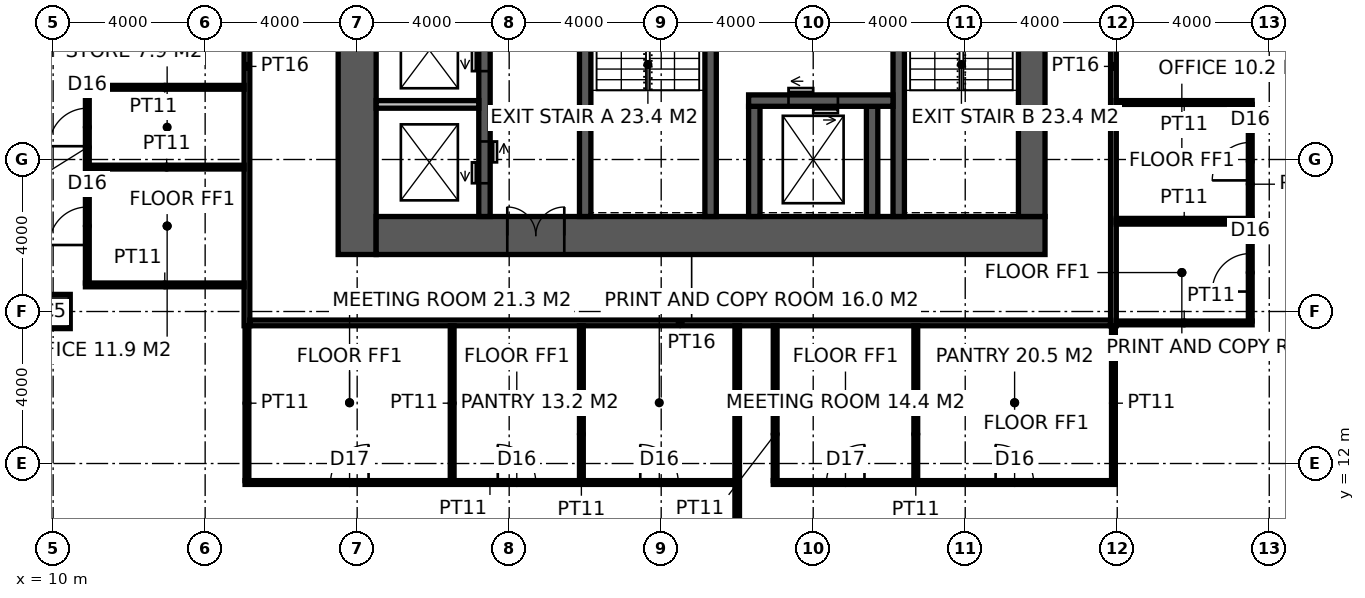
"""IFC4 building model, lengths in metres.
Left out: names, types, materials, properties, quantities, classifications, styles, units other than length and angle.
Written with IfcOpenShell. Run it as: python <this file> out.ifc"""

import sys

from ifc_helpers import new_model, si_unit, direction, frame, frame_2d, origin, origin_2d, place, context, subcontext, project, spatial, rectangle, hollow_rectangle, extrude, element, fill, save


model = new_model("IFC4")
c1 = context("Model", 3, precision=1e-05, world=origin(), true_north=direction((0.0, 1.0)))
c2 = subcontext(c1, "Body", "Model", "MODEL_VIEW")
j1 = project(units=[si_unit("LENGTHUNIT", "METRE"), si_unit("PLANEANGLEUNIT", "RADIAN")], contexts=[c1])
p1 = place(None, origin())
s1 = spatial("IfcSite", under=j1, at=p1, CompositionType="ELEMENT")
p2 = place(p1, origin())
s2 = spatial("IfcBuilding", under=s1, at=p2, CompositionType="ELEMENT")
p3 = place(p2, frame((0.0, 0.0, 147.8)))
s3 = spatial("IfcBuildingStorey", under=s2, at=p3, CompositionType="ELEMENT", Elevation=147.8)
p4 = place(p3, frame((10.0, 16.0, 0.0), z_axis=(0.0, 0.0, 1.0), x_axis=(1.0, 0.0, 0.0)))
e1 = element("IfcColumn", 1, at=p4, inside=s3, PredefinedType="COLUMN", context=c2, shape_type="SweptSolid", body=[
    extrude(hollow_rectangle(XDim=0.9, YDim=0.9, WallThickness=0.1, at=origin_2d()), origin(), (0.0, 0.0, 1.0), 4.0),
])
p5 = place(p3, frame((18.0, 17.5, -0.15), z_axis=(0.0, 0.0, 1.0), x_axis=(0.0, 1.0, 0.0)))
e2 = element("IfcWall", 2, at=p5, inside=s3, PredefinedType="SHEAR", context=c2, shape_type="SweptSolid", body=[
    extrude(rectangle(XDim=19.0, YDim=1.0, at=frame_2d((9.5, 0.0))), origin(), (0.0, 0.0, 1.0), 4.0),
])
p6 = place(p3, frame((18.5, 18.0, -0.15), z_axis=(0.0, 0.0, 1.0), x_axis=(1.0, 0.0, 0.0)))
e3 = element("IfcWall", 3, at=p6, inside=s3, PredefinedType="SHEAR", context=c2, shape_type="SweptSolid", body=[
    extrude(rectangle(XDim=17.6, YDim=1.0, at=frame_2d((8.8, 0.0))), origin(), (0.0, 0.0, 1.0), 4.0),
])
p7 = place(p6, frame((3.45, 0.0, 0.15)))
e4 = element("IfcOpeningElement", 4, at=p7, cuts=e3, PredefinedType="OPENING", context=c2, shape_type="SweptSolid", body=[
    extrude(rectangle(XDim=1.5, YDim=2.4, at=frame_2d((0.75, 1.2))), frame((0.0, 0.51, 0.0), z_axis=(0.0, -1.0, 0.0), x_axis=(1.0, 0.0, 0.0)), (0.0, 0.0, 1.0), 1.02),
])
p8 = place(p3, frame((35.75, 18.5, -0.15), z_axis=(0.0, 0.0, 1.0), x_axis=(0.0, 1.0, 0.0)))
e5 = element("IfcWall", 5, at=p8, inside=s3, PredefinedType="SHEAR", context=c2, shape_type="SweptSolid", body=[
    extrude(rectangle(XDim=17.0, YDim=0.7, at=frame_2d((8.5, 0.0))), origin(), (0.0, 0.0, 1.0), 4.0),
])
p9 = place(p8, frame((9.85, 0.0, 0.15)))
e6 = element("IfcOpeningElement", 6, at=p9, cuts=e5, PredefinedType="OPENING", context=c2, shape_type="SweptSolid", body=[
    extrude(rectangle(XDim=1.0, YDim=2.2, at=frame_2d((0.5, 1.1))), frame((0.0, 0.36, 0.0), z_axis=(0.0, -1.0, 0.0), x_axis=(1.0, 0.0, 0.0)), (0.0, 0.0, 1.0), 0.72),
])
p10 = place(p3, frame((24.0, 18.5, -0.15), z_axis=(0.0, 0.0, 1.0), x_axis=(0.0, 1.0, 0.0)))
e7 = element("IfcWall", 7, at=p10, inside=s3, PredefinedType="SHEAR", context=c2, shape_type="SweptSolid", body=[
    extrude(rectangle(XDim=17.0, YDim=0.3, at=frame_2d((8.5, 0.0))), origin(), (0.0, 0.0, 1.0), 4.0),
])
p11 = place(p10, frame((9.6, 0.0, 0.15)))
e8 = element("IfcOpeningElement", 8, at=p11, cuts=e7, PredefinedType="OPENING", context=c2, shape_type="SweptSolid", body=[
    extrude(rectangle(XDim=1.5, YDim=2.4, at=frame_2d((0.75, 1.2))), frame((0.0, 0.16, 0.0), z_axis=(0.0, -1.0, 0.0), x_axis=(1.0, 0.0, 0.0)), (0.0, 0.0, 1.0), 0.32),
])
p12 = place(p3, frame((27.3, 18.5, -0.15), z_axis=(0.0, 0.0, 1.0), x_axis=(0.0, 1.0, 0.0)))
e9 = element("IfcWall", 9, at=p12, inside=s3, PredefinedType="SHEAR", context=c2, shape_type="SweptSolid", body=[
    extrude(rectangle(XDim=7.9, YDim=0.3, at=frame_2d((3.95, 0.0))), origin(), (0.0, 0.0, 1.0), 4.0),
])
p13 = place(p12, frame((6.4, 0.0, 0.15)))
e10 = element("IfcOpeningElement", 10, at=p13, cuts=e9, PredefinedType="OPENING", context=c2, shape_type="SweptSolid", body=[
    extrude(rectangle(XDim=1.0, YDim=2.2, at=frame_2d((0.5, 1.1))), frame((0.0, 0.16, 0.0), z_axis=(0.0, -1.0, 0.0), x_axis=(1.0, 0.0, 0.0)), (0.0, 0.0, 1.0), 0.32),
])
p14 = place(p3, frame((32.25, 18.5, -0.15), z_axis=(0.0, 0.0, 1.0), x_axis=(0.0, 1.0, 0.0)))
e11 = element("IfcWall", 11, at=p14, inside=s3, PredefinedType="SHEAR", context=c2, shape_type="SweptSolid", body=[
    extrude(rectangle(XDim=7.9, YDim=0.3, at=frame_2d((3.95, 0.0))), origin(), (0.0, 0.0, 1.0), 4.0),
])
for number, where, z_axis, x_axis in (
    (12, (28.45, 18.5, -0.15), (0.0, 0.0, 1.0), (0.0, 1.0, 0.0)),
    (13, (31.55, 18.5, -0.15), (0.0, 0.0, 1.0), (0.0, 1.0, 0.0)),
):
    element("IfcWall", number, at=place(p3, frame(where, z_axis=z_axis, x_axis=x_axis)), inside=s3, PredefinedType="SHEAR", context=c2, shape_type="SweptSolid", body=[
        extrude(rectangle(XDim=2.9, YDim=0.3, at=frame_2d((1.45, 0.0))), origin(), (0.0, 0.0, 1.0), 4.0),
    ])
p15 = place(p3, frame((28.3, 21.55, -0.15), z_axis=(0.0, 0.0, 1.0), x_axis=(1.0, 0.0, 0.0)))
e14 = element("IfcWall", 14, at=p15, inside=s3, PredefinedType="SHEAR", context=c2, shape_type="SweptSolid", body=[
    extrude(rectangle(XDim=3.8, YDim=0.3, at=frame_2d((1.9, 0.0))), origin(), (0.0, 0.0, 1.0), 4.0),
])
p16 = place(p15, frame((1.05, 0.0, 0.15)))
e15 = element("IfcOpeningElement", 15, at=p16, cuts=e14, PredefinedType="OPENING", context=c2, shape_type="SweptSolid", body=[
    extrude(rectangle(XDim=1.3, YDim=2.4, at=frame_2d((0.65, 1.2))), frame((0.0, 0.16, 0.0), z_axis=(0.0, -1.0, 0.0), x_axis=(1.0, 0.0, 0.0)), (0.0, 0.0, 1.0), 0.32),
])
p17 = place(p3, frame((21.35, 18.5, -0.15), z_axis=(0.0, 0.0, 1.0), x_axis=(0.0, 1.0, 0.0)))
e16 = element("IfcWall", 16, at=p17, inside=s3, PredefinedType="SHEAR", context=c2, shape_type="SweptSolid", body=[
    extrude(rectangle(XDim=12.5, YDim=0.3, at=frame_2d((6.25, 0.0))), origin(), (0.0, 0.0, 1.0), 4.0),
])
p18 = place(p17, frame((0.875, 0.0, 0.15)))
e17 = element("IfcOpeningElement", 17, at=p18, cuts=e16, PredefinedType="OPENING", context=c2, shape_type="SweptSolid", body=[
    extrude(rectangle(XDim=1.1, YDim=2.2, at=frame_2d((0.55, 1.1))), frame((0.0, 0.16, 0.0), z_axis=(0.0, -1.0, 0.0), x_axis=(1.0, 0.0, 0.0)), (0.0, 0.0, 1.0), 0.32),
])
p19 = place(p17, frame((3.825, 0.0, 0.15)))
e18 = element("IfcOpeningElement", 18, at=p19, cuts=e16, PredefinedType="OPENING", context=c2, shape_type="SweptSolid", body=[
    extrude(rectangle(XDim=1.1, YDim=2.2, at=frame_2d((0.55, 1.1))), frame((0.0, 0.16, 0.0), z_axis=(0.0, -1.0, 0.0), x_axis=(1.0, 0.0, 0.0)), (0.0, 0.0, 1.0), 0.32),
])
p20 = place(p17, frame((6.675, 0.0, 0.15)))
e19 = element("IfcOpeningElement", 19, at=p20, cuts=e16, PredefinedType="OPENING", context=c2, shape_type="SweptSolid", body=[
    extrude(rectangle(XDim=1.1, YDim=2.2, at=frame_2d((0.55, 1.1))), frame((0.0, 0.16, 0.0), z_axis=(0.0, -1.0, 0.0), x_axis=(1.0, 0.0, 0.0)), (0.0, 0.0, 1.0), 0.32),
])
p21 = place(p17, frame((9.575, 0.0, 0.15)))
e20 = element("IfcOpeningElement", 20, at=p21, cuts=e16, PredefinedType="OPENING", context=c2, shape_type="SweptSolid", body=[
    extrude(rectangle(XDim=1.1, YDim=2.2, at=frame_2d((0.55, 1.1))), frame((0.0, 0.16, 0.0), z_axis=(0.0, -1.0, 0.0), x_axis=(1.0, 0.0, 0.0)), (0.0, 0.0, 1.0), 0.32),
])
p22 = place(p3, frame((18.5, 21.45, -0.15), z_axis=(0.0, 0.0, 1.0), x_axis=(1.0, 0.0, 0.0)))
e21 = element("IfcWall", 21, at=p22, inside=s3, PredefinedType="SOLIDWALL", context=c2, shape_type="SweptSolid", body=[
    extrude(rectangle(XDim=2.7, YDim=0.2, at=frame_2d((1.35, 0.0))), origin(), (0.0, 0.0, 1.0), 4.0),
])
p23 = place(p3, frame((15.1, 15.625, 0.0), z_axis=(0.0, 0.0, 1.0), x_axis=(0.0, 1.0, 0.0)))
e22 = element("IfcWall", 22, at=p23, inside=s3, PredefinedType="PARTITIONING", context=c2, shape_type="SweptSolid", body=[
    extrude(rectangle(XDim=22.75, YDim=0.15, at=frame_2d((11.375, 0.0))), origin(), (0.0, 0.0, 1.0), 3.85),
])
p24 = place(p23, frame((10.475, 0.0, 0.0)))
e23 = element("IfcOpeningElement", 23, at=p24, cuts=e22, PredefinedType="OPENING", context=c2, shape_type="SweptSolid", body=[
    extrude(rectangle(XDim=1.8, YDim=2.4, at=frame_2d((0.9, 1.2))), frame((0.0, 0.085, 0.0), z_axis=(0.0, -1.0, 0.0), x_axis=(1.0, 0.0, 0.0)), (0.0, 0.0, 1.0), 0.17),
])
p25 = place(p3, frame((37.9, 15.625, 0.0), z_axis=(0.0, 0.0, 1.0), x_axis=(0.0, 1.0, 0.0)))
e24 = element("IfcWall", 24, at=p25, inside=s3, PredefinedType="PARTITIONING", context=c2, shape_type="SweptSolid", body=[
    extrude(rectangle(XDim=22.75, YDim=0.15, at=frame_2d((11.375, 0.0))), origin(), (0.0, 0.0, 1.0), 2.95),
])
p26 = place(p25, frame((10.475, 0.0, 0.0)))
e25 = element("IfcOpeningElement", 25, at=p26, cuts=e24, PredefinedType="OPENING", context=c2, shape_type="SweptSolid", body=[
    extrude(rectangle(XDim=1.8, YDim=2.4, at=frame_2d((0.9, 1.2))), frame((0.0, 0.085, 0.0), z_axis=(0.0, -1.0, 0.0), x_axis=(1.0, 0.0, 0.0)), (0.0, 0.0, 1.0), 0.17),
])
p27 = place(p3, frame((15.175, 15.7, 0.0), z_axis=(0.0, 0.0, 1.0), x_axis=(1.0, 0.0, 0.0)))
e26 = element("IfcWall", 26, at=p27, inside=s3, PredefinedType="PARTITIONING", context=c2, shape_type="SweptSolid", body=[
    extrude(rectangle(XDim=22.65, YDim=0.15, at=frame_2d((11.325, 0.0))), origin(), (0.0, 0.0, 1.0), 3.85),
])
p28 = place(p3, frame((28.0, 4.3, 0.0), z_axis=(0.0, 0.0, 1.0), x_axis=(0.0, 1.0, 0.0)))
e27 = element("IfcWall", 27, at=p28, inside=s3, PredefinedType="PARTITIONING", context=c2, shape_type="SweptSolid", body=[
    extrude(rectangle(XDim=11.325, YDim=0.12, at=frame_2d((5.663, 0.0))), origin(), (0.0, 0.0, 1.0), 3.85),
])
p29 = place(p3, frame((15.05, 11.5, 0.0), z_axis=(0.0, 0.0, 1.0), x_axis=(1.0, 0.0, 0.0)))
e28 = element("IfcWall", 28, at=p29, inside=s3, PredefinedType="PARTITIONING", context=c2, shape_type="SweptSolid", body=[
    extrude(rectangle(XDim=12.889, YDim=0.1, at=frame_2d((6.444, 0.0))), origin(), (0.0, 0.0, 1.0), 3.85),
])
p30 = place(p29, frame((2.25, 0.0, 0.0)))
e29 = element("IfcOpeningElement", 29, at=p30, cuts=e28, PredefinedType="OPENING", context=c2, shape_type="SweptSolid", body=[
    extrude(rectangle(XDim=1.0, YDim=2.2, at=frame_2d((0.5, 1.1))), frame((0.0, 0.06, 0.0), z_axis=(0.0, -1.0, 0.0), x_axis=(1.0, 0.0, 0.0)), (0.0, 0.0, 1.0), 0.12),
])
p31 = place(p29, frame((6.65, 0.0, 0.0)))
e30 = element("IfcOpeningElement", 30, at=p31, cuts=e28, PredefinedType="OPENING", context=c2, shape_type="SweptSolid", body=[
    extrude(rectangle(XDim=1.0, YDim=2.2, at=frame_2d((0.5, 1.1))), frame((0.0, 0.06, 0.0), z_axis=(0.0, -1.0, 0.0), x_axis=(1.0, 0.0, 0.0)), (0.0, 0.0, 1.0), 0.12),
])
p32 = place(p29, frame((10.399, 0.0, 0.0)))
e31 = element("IfcOpeningElement", 31, at=p32, cuts=e28, PredefinedType="OPENING", context=c2, shape_type="SweptSolid", body=[
    extrude(rectangle(XDim=1.0, YDim=2.2, at=frame_2d((0.5, 1.1))), frame((0.0, 0.06, 0.0), z_axis=(0.0, -1.0, 0.0), x_axis=(1.0, 0.0, 0.0)), (0.0, 0.0, 1.0), 0.12),
])
p33 = place(p3, frame((28.949, 11.5, 0.0), z_axis=(0.0, 0.0, 1.0), x_axis=(1.0, 0.0, 0.0)))
e32 = element("IfcWall", 32, at=p33, inside=s3, PredefinedType="PARTITIONING", context=c2, shape_type="SweptSolid", body=[
    extrude(rectangle(XDim=9.001, YDim=0.1, at=frame_2d((4.5, 0.0))), origin(), (0.0, 0.0, 1.0), 3.85),
])
p34 = place(p33, frame((1.4, 0.0, 0.0)))
e33 = element("IfcOpeningElement", 33, at=p34, cuts=e32, PredefinedType="OPENING", context=c2, shape_type="SweptSolid", body=[
    extrude(rectangle(XDim=1.0, YDim=2.2, at=frame_2d((0.5, 1.1))), frame((0.0, 0.06, 0.0), z_axis=(0.0, -1.0, 0.0), x_axis=(1.0, 0.0, 0.0)), (0.0, 0.0, 1.0), 0.12),
])
p35 = place(p33, frame((5.851, 0.0, 0.0)))
e34 = element("IfcOpeningElement", 34, at=p35, cuts=e32, PredefinedType="OPENING", context=c2, shape_type="SweptSolid", body=[
    extrude(rectangle(XDim=1.0, YDim=2.2, at=frame_2d((0.5, 1.1))), frame((0.0, 0.06, 0.0), z_axis=(0.0, -1.0, 0.0), x_axis=(1.0, 0.0, 0.0)), (0.0, 0.0, 1.0), 0.12),
])
p36 = place(p3, frame((37.975, 15.7, 0.0), z_axis=(0.0, 0.0, 1.0), x_axis=(1.0, 0.0, 0.0)))
e35 = element("IfcWall", 35, at=p36, inside=s3, PredefinedType="PARTITIONING", context=c2, shape_type="SweptSolid", body=[
    extrude(rectangle(XDim=3.575, YDim=0.1, at=frame_2d((1.788, 0.0))), origin(), (0.0, 0.0, 1.0), 3.85),
])
p37 = place(p3, frame((10.85, 16.7, 0.0), z_axis=(0.0, 0.0, 1.0), x_axis=(1.0, 0.0, 0.0)))
e36 = element("IfcWall", 36, at=p37, inside=s3, PredefinedType="PARTITIONING", context=c2, shape_type="SweptSolid", body=[
    extrude(rectangle(XDim=4.175, YDim=0.1, at=frame_2d((2.087, 0.0))), origin(), (0.0, 0.0, 1.0), 3.85),
])
for number, where, z_axis, x_axis in (
    (37, (37.975, 18.35, 0.0), (0.0, 0.0, 1.0), (1.0, 0.0, 0.0)),
    (38, (37.975, 18.4, 0.0), (0.0, 0.0, 1.0), (1.0, 0.0, 0.0)),
):
    element("IfcWall", number, at=place(p3, frame(where, z_axis=z_axis, x_axis=x_axis)), inside=s3, PredefinedType="PARTITIONING", context=c2, shape_type="SweptSolid", body=[
        extrude(rectangle(XDim=3.575, YDim=0.1, at=frame_2d((1.788, 0.0))), origin(), (0.0, 0.0, 1.0), 3.85),
    ])
p38 = place(p3, frame((10.95, 19.8, 0.0), z_axis=(0.0, 0.0, 1.0), x_axis=(1.0, 0.0, 0.0)))
e39 = element("IfcWall", 39, at=p38, inside=s3, PredefinedType="PARTITIONING", context=c2, shape_type="SweptSolid", body=[
    extrude(rectangle(XDim=4.075, YDim=0.1, at=frame_2d((2.038, 0.0))), origin(), (0.0, 0.0, 1.0), 2.85),
])
p39 = place(p3, frame((37.975, 21.5, 0.0), z_axis=(0.0, 0.0, 1.0), x_axis=(1.0, 0.0, 0.0)))
e40 = element("IfcWall", 40, at=p39, inside=s3, PredefinedType="PARTITIONING", context=c2, shape_type="SweptSolid", body=[
    extrude(rectangle(XDim=3.575, YDim=0.1, at=frame_2d((1.788, 0.0))), origin(), (0.0, 0.0, 1.0), 3.85),
])
p40 = place(p3, frame((10.85, 21.9, 0.0), z_axis=(0.0, 0.0, 1.0), x_axis=(1.0, 0.0, 0.0)))
e41 = element("IfcWall", 41, at=p40, inside=s3, PredefinedType="PARTITIONING", context=c2, shape_type="SweptSolid", body=[
    extrude(rectangle(XDim=4.175, YDim=0.1, at=frame_2d((2.087, 0.0))), origin(), (0.0, 0.0, 1.0), 3.85),
])
p41 = place(p3, frame((10.9, 16.75, 0.0), z_axis=(0.0, 0.0, 1.0), x_axis=(0.0, 1.0, 0.0)))
e42 = element("IfcWall", 42, at=p41, inside=s3, PredefinedType="PARTITIONING", context=c2, shape_type="SweptSolid", body=[
    extrude(rectangle(XDim=5.1, YDim=0.1, at=frame_2d((2.55, 0.0))), origin(), (0.0, 0.0, 1.0), 3.85),
])
p42 = place(p41, frame((1.0, 0.0, 0.0)))
e43 = element("IfcOpeningElement", 43, at=p42, cuts=e42, PredefinedType="OPENING", context=c2, shape_type="SweptSolid", body=[
    extrude(rectangle(XDim=1.0, YDim=2.2, at=frame_2d((0.5, 1.1))), frame((0.0, 0.06, 0.0), z_axis=(0.0, -1.0, 0.0), x_axis=(1.0, 0.0, 0.0)), (0.0, 0.0, 1.0), 0.12),
])
p43 = place(p41, frame((3.6, 0.0, 0.0)))
e44 = element("IfcOpeningElement", 44, at=p43, cuts=e42, PredefinedType="OPENING", context=c2, shape_type="SweptSolid", body=[
    extrude(rectangle(XDim=1.0, YDim=2.2, at=frame_2d((0.5, 1.1))), frame((0.0, 0.06, 0.0), z_axis=(0.0, -1.0, 0.0), x_axis=(1.0, 0.0, 0.0)), (0.0, 0.0, 1.0), 0.12),
])
for number, where, z_axis, x_axis in (
    (45, (15.1, 11.55, 0.0), (0.0, 0.0, 1.0), (0.0, 1.0, 0.0)),
    (46, (20.5, 11.55, 0.0), (0.0, 0.0, 1.0), (0.0, 1.0, 0.0)),
    (47, (23.9, 11.55, 0.0), (0.0, 0.0, 1.0), (0.0, 1.0, 0.0)),
    (48, (28.999, 11.55, 0.0), (0.0, 0.0, 1.0), (0.0, 1.0, 0.0)),
    (49, (32.699, 11.55, 0.0), (0.0, 0.0, 1.0), (0.0, 1.0, 0.0)),
):
    element("IfcWall", number, at=place(p3, frame(where, z_axis=z_axis, x_axis=x_axis)), inside=s3, PredefinedType="PARTITIONING", context=c2, shape_type="SweptSolid", body=[
        extrude(rectangle(XDim=4.075, YDim=0.1, at=frame_2d((2.038, 0.0))), origin(), (0.0, 0.0, 1.0), 3.85),
    ])
p44 = place(p3, frame((37.9, 11.55, 0.0), z_axis=(0.0, 0.0, 1.0), x_axis=(0.0, 1.0, 0.0)))
e50 = element("IfcWall", 50, at=p44, inside=s3, PredefinedType="PARTITIONING", context=c2, shape_type="SweptSolid", body=[
    extrude(rectangle(XDim=4.075, YDim=0.1, at=frame_2d((2.038, 0.0))), origin(), (0.0, 0.0, 1.0), 2.95),
])
p45 = place(p3, frame((41.5, 15.75, 0.0), z_axis=(0.0, 0.0, 1.0), x_axis=(0.0, 1.0, 0.0)))
e51 = element("IfcWall", 51, at=p45, inside=s3, PredefinedType="PARTITIONING", context=c2, shape_type="SweptSolid", body=[
    extrude(rectangle(XDim=2.55, YDim=0.1, at=frame_2d((1.275, 0.0))), origin(), (0.0, 0.0, 1.0), 3.85),
])
p46 = place(p45, frame((0.775, 0.0, 0.0)))
e52 = element("IfcOpeningElement", 52, at=p46, cuts=e51, PredefinedType="OPENING", context=c2, shape_type="SweptSolid", body=[
    extrude(rectangle(XDim=1.0, YDim=2.2, at=frame_2d((0.5, 1.1))), frame((0.0, 0.06, 0.0), z_axis=(0.0, -1.0, 0.0), x_axis=(1.0, 0.0, 0.0)), (0.0, 0.0, 1.0), 0.12),
])
p47 = place(p3, frame((41.5, 18.45, 0.0), z_axis=(0.0, 0.0, 1.0), x_axis=(0.0, 1.0, 0.0)))
e53 = element("IfcWall", 53, at=p47, inside=s3, PredefinedType="PARTITIONING", context=c2, shape_type="SweptSolid", body=[
    extrude(rectangle(XDim=3.0, YDim=0.1, at=frame_2d((1.5, 0.0))), origin(), (0.0, 0.0, 1.0), 3.85),
])
p48 = place(p47, frame((1.0, 0.0, 0.0)))
e54 = element("IfcOpeningElement", 54, at=p48, cuts=e53, PredefinedType="OPENING", context=c2, shape_type="SweptSolid", body=[
    extrude(rectangle(XDim=1.0, YDim=2.2, at=frame_2d((0.5, 1.1))), frame((0.0, 0.06, 0.0), z_axis=(0.0, -1.0, 0.0), x_axis=(1.0, 0.0, 0.0)), (0.0, 0.0, 1.0), 0.12),
])
p49 = place(p7, origin())
e55 = element("IfcDoor", 55, at=p49, inside=s3, OperationType="DOUBLE_DOOR_DOUBLE_SWING", PredefinedType="DOOR", context=c2, shape_type="SweptSolid", body=[
    extrude(rectangle(XDim=1.5, YDim=2.4, at=frame_2d((0.75, 1.2))), frame((0.0, 0.025, 0.0), z_axis=(0.0, -1.0, 0.0), x_axis=(1.0, 0.0, 0.0)), (0.0, 0.0, 1.0), 0.05),
])
fill(e4, e55)
p50 = place(p30, origin())
e56 = element("IfcDoor", 56, at=p50, inside=s3, OperationType="SINGLE_SWING_RIGHT", PredefinedType="DOOR", context=c2, shape_type="SweptSolid", body=[
    extrude(rectangle(XDim=1.0, YDim=2.2, at=frame_2d((0.5, 1.1))), frame((0.0, 0.025, 0.0), z_axis=(0.0, -1.0, 0.0), x_axis=(1.0, 0.0, 0.0)), (0.0, 0.0, 1.0), 0.05),
])
fill(e29, e56)
p51 = place(p31, origin())
e57 = element("IfcDoor", 57, at=p51, inside=s3, OperationType="SINGLE_SWING_LEFT", PredefinedType="DOOR", context=c2, shape_type="SweptSolid", body=[
    extrude(rectangle(XDim=1.0, YDim=2.2, at=frame_2d((0.5, 1.1))), frame((0.0, 0.025, 0.0), z_axis=(0.0, -1.0, 0.0), x_axis=(1.0, 0.0, 0.0)), (0.0, 0.0, 1.0), 0.05),
])
fill(e30, e57)
p52 = place(p32, origin())
e58 = element("IfcDoor", 58, at=p52, inside=s3, OperationType="SINGLE_SWING_LEFT", PredefinedType="DOOR", context=c2, shape_type="SweptSolid", body=[
    extrude(rectangle(XDim=1.0, YDim=2.2, at=frame_2d((0.5, 1.1))), frame((0.0, 0.025, 0.0), z_axis=(0.0, -1.0, 0.0), x_axis=(1.0, 0.0, 0.0)), (0.0, 0.0, 1.0), 0.05),
])
fill(e31, e58)
p53 = place(p42, origin())
e59 = element("IfcDoor", 59, at=p53, inside=s3, OperationType="SINGLE_SWING_LEFT", PredefinedType="DOOR", context=c2, shape_type="SweptSolid", body=[
    extrude(rectangle(XDim=1.0, YDim=2.2, at=frame_2d((0.5, 1.1))), frame((0.0, 0.025, 0.0), z_axis=(0.0, -1.0, 0.0), x_axis=(1.0, 0.0, 0.0)), (0.0, 0.0, 1.0), 0.05),
])
fill(e43, e59)
p54 = place(p43, origin())
e60 = element("IfcDoor", 60, at=p54, inside=s3, OperationType="SINGLE_SWING_LEFT", PredefinedType="DOOR", context=c2, shape_type="SweptSolid", body=[
    extrude(rectangle(XDim=1.0, YDim=2.2, at=frame_2d((0.5, 1.1))), frame((0.0, 0.025, 0.0), z_axis=(0.0, -1.0, 0.0), x_axis=(1.0, 0.0, 0.0)), (0.0, 0.0, 1.0), 0.05),
])
fill(e44, e60)
p55 = place(p34, origin())
e61 = element("IfcDoor", 61, at=p55, inside=s3, OperationType="SINGLE_SWING_RIGHT", PredefinedType="DOOR", context=c2, shape_type="SweptSolid", body=[
    extrude(rectangle(XDim=1.0, YDim=2.2, at=frame_2d((0.5, 1.1))), frame((0.0, 0.025, 0.0), z_axis=(0.0, -1.0, 0.0), x_axis=(1.0, 0.0, 0.0)), (0.0, 0.0, 1.0), 0.05),
])
fill(e33, e61)
p56 = place(p35, origin())
e62 = element("IfcDoor", 62, at=p56, inside=s3, OperationType="SINGLE_SWING_LEFT", PredefinedType="DOOR", context=c2, shape_type="SweptSolid", body=[
    extrude(rectangle(XDim=1.0, YDim=2.2, at=frame_2d((0.5, 1.1))), frame((0.0, 0.025, 0.0), z_axis=(0.0, -1.0, 0.0), x_axis=(1.0, 0.0, 0.0)), (0.0, 0.0, 1.0), 0.05),
])
fill(e34, e62)
p57 = place(p46, origin())
e63 = element("IfcDoor", 63, at=p57, inside=s3, OperationType="SINGLE_SWING_LEFT", PredefinedType="DOOR", context=c2, shape_type="SweptSolid", body=[
    extrude(rectangle(XDim=1.0, YDim=2.2, at=frame_2d((0.5, 1.1))), frame((0.0, 0.025, 0.0), z_axis=(0.0, -1.0, 0.0), x_axis=(1.0, 0.0, 0.0)), (0.0, 0.0, 1.0), 0.05),
])
fill(e52, e63)
p58 = place(p48, origin())
e64 = element("IfcDoor", 64, at=p58, inside=s3, OperationType="SINGLE_SWING_LEFT", PredefinedType="DOOR", context=c2, shape_type="SweptSolid", body=[
    extrude(rectangle(XDim=1.0, YDim=2.2, at=frame_2d((0.5, 1.1))), frame((0.0, 0.025, 0.0), z_axis=(0.0, -1.0, 0.0), x_axis=(1.0, 0.0, 0.0)), (0.0, 0.0, 1.0), 0.05),
])
fill(e54, e64)
p59 = place(p16, origin())
e65 = element("IfcDoor", 65, at=p59, inside=s3, OperationType="DOUBLE_DOOR_SLIDING", PredefinedType="DOOR", context=c2, shape_type="SweptSolid", body=[
    extrude(rectangle(XDim=1.3, YDim=2.4, at=frame_2d((0.65, 1.2))), frame((0.0, 0.025, 0.0), z_axis=(0.0, -1.0, 0.0), x_axis=(1.0, 0.0, 0.0)), (0.0, 0.0, 1.0), 0.05),
])
fill(e15, e65)
p60 = place(p18, origin())
e66 = element("IfcDoor", 66, at=p60, inside=s3, OperationType="DOUBLE_DOOR_SLIDING", PredefinedType="DOOR", context=c2, shape_type="SweptSolid", body=[
    extrude(rectangle(XDim=1.1, YDim=2.2, at=frame_2d((0.55, 1.1))), frame((0.0, 0.025, 0.0), z_axis=(0.0, -1.0, 0.0), x_axis=(1.0, 0.0, 0.0)), (0.0, 0.0, 1.0), 0.05),
])
fill(e17, e66)
p61 = place(p19, origin())
e67 = element("IfcDoor", 67, at=p61, inside=s3, OperationType="DOUBLE_DOOR_SLIDING", PredefinedType="DOOR", context=c2, shape_type="SweptSolid", body=[
    extrude(rectangle(XDim=1.1, YDim=2.2, at=frame_2d((0.55, 1.1))), frame((0.0, 0.025, 0.0), z_axis=(0.0, -1.0, 0.0), x_axis=(1.0, 0.0, 0.0)), (0.0, 0.0, 1.0), 0.05),
])
fill(e18, e67)
save(model, sys.argv[1])
